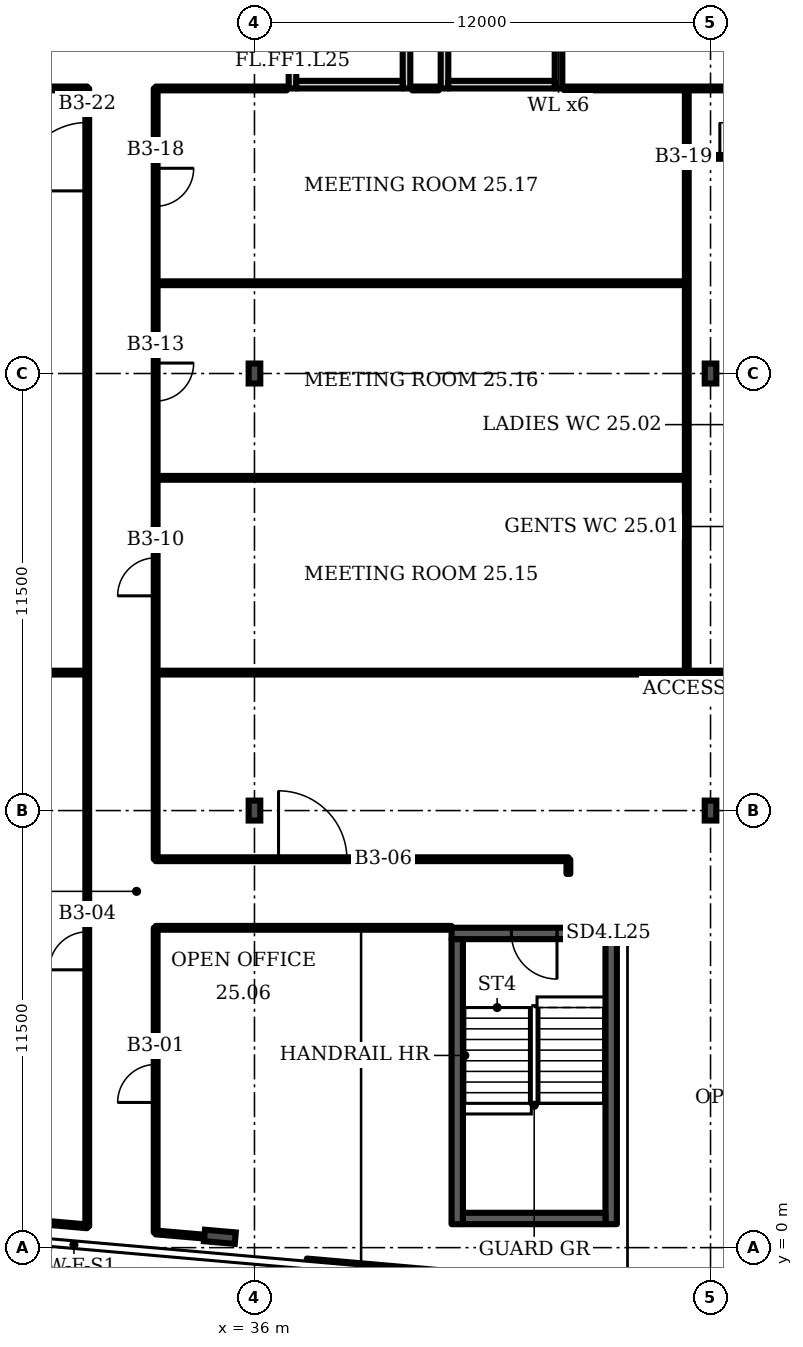
"""IFC4 building model, lengths in metres.
Left out: names, types, materials, properties, quantities, classifications, styles, units other than length and angle.
Written with IfcOpenShell. Run it as: python <this file> out.ifc"""

import sys

from ifc_helpers import new_model, si_unit, direction, frame, frame_2d, origin, origin_2d, place, context, subcontext, project, spatial, rectangle, i_section, extrude, element, fill, save


model = new_model("IFC4")
c1 = context("Model", 3, precision=1e-05, world=origin(), true_north=direction((0.0, 1.0)))
c2 = subcontext(c1, "Body", "Model", "MODEL_VIEW")
j1 = project(units=[si_unit("LENGTHUNIT", "METRE"), si_unit("PLANEANGLEUNIT", "RADIAN")], contexts=[c1])
p1 = place(None, origin())
s1 = spatial("IfcSite", under=j1, at=p1, CompositionType="ELEMENT")
p2 = place(p1, origin())
s2 = spatial("IfcBuilding", under=s1, at=p2, CompositionType="ELEMENT")
p3 = place(p2, frame((0.0, 0.0, 111.1)))
s3 = spatial("IfcBuildingStorey", under=s2, at=p3, CompositionType="ELEMENT", Elevation=111.1)
p4 = place(p3, frame((35.089, 0.285, 0.0), z_axis=(0.0, 0.0, 1.0), x_axis=(-0.087156, -0.996198, 0.0)))
e1 = element("IfcColumn", 1, at=p4, inside=s3, PredefinedType="COLUMN", context=c2, shape_type="SweptSolid", body=[
    extrude(i_section(OverallWidth=0.303, OverallDepth=0.814, WebThickness=0.021, FlangeThickness=0.04, FilletRadius=0.03, at=origin_2d()), origin(), (0.0, 0.0, 1.0), 3.6),
])
for number, where, z_axis, x_axis in (
    (2, (36.0, 11.5, 0.0), (0.0, 0.0, 1.0), (1.0, 0.0, 0.0)),
    (3, (48.0, 11.5, 0.0), (0.0, 0.0, 1.0), (1.0, 0.0, 0.0)),
    (4, (36.0, 23.0, 0.0), (0.0, 0.0, 1.0), (1.0, 0.0, 0.0)),
    (5, (48.0, 23.0, 0.0), (0.0, 0.0, 1.0), (1.0, 0.0, 0.0)),
):
    element("IfcColumn", number, at=place(p3, frame(where, z_axis=z_axis, x_axis=x_axis)), inside=s3, PredefinedType="COLUMN", context=c2, shape_type="SweptSolid", body=[
        extrude(i_section(OverallWidth=0.306, OverallDepth=0.524, WebThickness=0.021, FlangeThickness=0.04, FilletRadius=0.027, at=origin_2d()), origin(), (0.0, 0.0, 1.0), 3.6),
    ])
p5 = place(p3, frame((37.363, -0.461, 0.0), z_axis=(0.0, 0.0, 1.0), x_axis=(0.996194, -0.087159, 0.0)))
e6 = element("IfcWall", 6, at=p5, inside=s3, PredefinedType="SOLIDWALL", context=c2, shape_type="SweptSolid", body=[
    extrude(rectangle(XDim=12.199, YDim=0.35, at=frame_2d((6.099, 0.0))), origin(), (0.0, 0.0, 1.0), 1.0),
])
p6 = place(p3, frame((37.0, 30.5, 0.0), z_axis=(0.0, 0.0, 1.0), x_axis=(0.0, 1.0, 0.0)))
e7 = element("IfcWall", 7, at=p6, inside=s3, PredefinedType="PARTITIONING", context=c2, shape_type="SweptSolid", body=[
    extrude(rectangle(XDim=3.5, YDim=0.2, at=frame_2d((1.75, 0.0))), origin(), (0.0, 0.0, 1.0), 3.2),
])
p7 = place(p6, frame((1.2, 0.0, 0.0)))
e8 = element("IfcOpeningElement", 8, at=p7, cuts=e7, PredefinedType="OPENING", context=c2, shape_type="SweptSolid", body=[
    extrude(rectangle(XDim=1.1, YDim=2.1, at=frame_2d((0.55, 1.05))), frame((0.0, 0.11, 0.0), z_axis=(0.0, -1.0, 0.0), x_axis=(1.0, 0.0, 0.0)), (0.0, 0.0, 1.0), 0.22),
])
p8 = place(p3, frame((40.0, 30.5, 0.0), z_axis=(0.0, 0.0, 1.0), x_axis=(0.0, 1.0, 0.0)))
e9 = element("IfcWall", 9, at=p8, inside=s3, PredefinedType="PARTITIONING", context=c2, shape_type="SweptSolid", body=[
    extrude(rectangle(XDim=3.5, YDim=0.2, at=frame_2d((1.75, 0.0))), origin(), (0.0, 0.0, 1.0), 3.2),
])
p9 = place(p3, frame((37.1, 30.6, 0.0), z_axis=(0.0, 0.0, 1.0), x_axis=(1.0, 0.0, 0.0)))
e10 = element("IfcWall", 10, at=p9, inside=s3, PredefinedType="PARTITIONING", context=c2, shape_type="SweptSolid", body=[
    extrude(rectangle(XDim=2.8, YDim=0.2, at=frame_2d((1.4, 0.0))), origin(), (0.0, 0.0, 1.0), 3.2),
])
p10 = place(p3, frame((41.0, 30.5, 0.0), z_axis=(0.0, 0.0, 1.0), x_axis=(0.0, 1.0, 0.0)))
e11 = element("IfcWall", 11, at=p10, inside=s3, PredefinedType="PARTITIONING", context=c2, shape_type="SweptSolid", body=[
    extrude(rectangle(XDim=3.5, YDim=0.2, at=frame_2d((1.75, 0.0))), origin(), (0.0, 0.0, 1.0), 3.2),
])
p11 = place(p3, frame((44.0, 30.5, 0.0), z_axis=(0.0, 0.0, 1.0), x_axis=(0.0, 1.0, 0.0)))
e12 = element("IfcWall", 12, at=p11, inside=s3, PredefinedType="PARTITIONING", context=c2, shape_type="SweptSolid", body=[
    extrude(rectangle(XDim=3.5, YDim=0.2, at=frame_2d((1.75, 0.0))), origin(), (0.0, 0.0, 1.0), 3.2),
])
p12 = place(p11, frame((1.2, 0.0, 0.0)))
e13 = element("IfcOpeningElement", 13, at=p12, cuts=e12, PredefinedType="OPENING", context=c2, shape_type="SweptSolid", body=[
    extrude(rectangle(XDim=1.1, YDim=2.1, at=frame_2d((0.55, 1.05))), frame((0.0, 0.11, 0.0), z_axis=(0.0, -1.0, 0.0), x_axis=(1.0, 0.0, 0.0)), (0.0, 0.0, 1.0), 0.22),
])
p13 = place(p3, frame((41.1, 30.6, 0.0), z_axis=(0.0, 0.0, 1.0), x_axis=(1.0, 0.0, 0.0)))
e14 = element("IfcWall", 14, at=p13, inside=s3, PredefinedType="PARTITIONING", context=c2, shape_type="SweptSolid", body=[
    extrude(rectangle(XDim=2.8, YDim=0.2, at=frame_2d((1.4, 0.0))), origin(), (0.0, 0.0, 1.0), 3.2),
])
p14 = place(p3, frame((41.185, 8.267, 0.0), z_axis=(0.0, 0.0, 1.0), x_axis=(1.0, 0.0, 0.0)))
e15 = element("IfcWall", 15, at=p14, inside=s3, PredefinedType="SHEAR", context=c2, shape_type="SweptSolid", body=[
    extrude(rectangle(XDim=4.35, YDim=0.3, at=frame_2d((2.175, 0.0))), origin(), (0.0, 0.0, 1.0), 3.2),
])
p15 = place(p14, frame((1.575, 0.0, 0.0)))
e16 = element("IfcOpeningElement", 16, at=p15, cuts=e15, PredefinedType="OPENING", context=c2, shape_type="SweptSolid", body=[
    extrude(rectangle(XDim=1.2, YDim=2.1, at=frame_2d((0.6, 1.05))), frame((0.0, 0.16, 0.0), z_axis=(0.0, -1.0, 0.0), x_axis=(1.0, 0.0, 0.0)), (0.0, 0.0, 1.0), 0.32),
])
p16 = place(p3, frame((13.0, 15.13, 0.0), z_axis=(0.0, 0.0, 1.0), x_axis=(1.0, 0.0, 0.0)))
e17 = element("IfcWall", 17, at=p16, inside=s3, PredefinedType="PARTITIONING", context=c2, shape_type="SweptSolid", body=[
    extrude(rectangle(XDim=18.6, YDim=0.1, at=frame_2d((9.3, 0.0))), origin(), (0.0, 0.0, 1.0), 3.2),
])
p17 = place(p3, frame((17.8, 30.5, 0.0), z_axis=(0.0, 0.0, 1.0), x_axis=(1.0, 0.0, 0.0)))
e18 = element("IfcWall", 18, at=p17, inside=s3, PredefinedType="PARTITIONING", context=c2, shape_type="SweptSolid", body=[
    extrude(rectangle(XDim=13.8, YDim=0.1, at=frame_2d((6.9, 0.0))), origin(), (0.0, 0.0, 1.0), 3.2),
])
p18 = place(p3, frame((31.6, 0.56, 0.0), z_axis=(0.0, 0.0, 1.0), x_axis=(0.0, 1.0, 0.0)))
e19 = element("IfcWall", 19, at=p18, inside=s3, PredefinedType="PARTITIONING", context=c2, shape_type="SweptSolid", body=[
    extrude(rectangle(XDim=29.94, YDim=0.1, at=frame_2d((14.97, 0.0))), origin(), (0.0, 0.0, 1.0), 3.2),
])
p19 = place(p18, frame((6.75, 0.0, 0.0)))
e20 = element("IfcOpeningElement", 20, at=p19, cuts=e19, PredefinedType="OPENING", context=c2, shape_type="SweptSolid", body=[
    extrude(rectangle(XDim=1.0, YDim=2.1, at=frame_2d((0.5, 1.05))), frame((0.0, 0.06, 0.0), z_axis=(0.0, -1.0, 0.0), x_axis=(1.0, 0.0, 0.0)), (0.0, 0.0, 1.0), 0.12),
])
p20 = place(p18, frame((27.245, 0.0, 0.0)))
e21 = element("IfcOpeningElement", 21, at=p20, cuts=e19, PredefinedType="OPENING", context=c2, shape_type="SweptSolid", body=[
    extrude(rectangle(XDim=1.8, YDim=2.1, at=frame_2d((0.9, 1.05))), frame((0.0, 0.06, 0.0), z_axis=(0.0, -1.0, 0.0), x_axis=(1.0, 0.0, 0.0)), (0.0, 0.0, 1.0), 0.12),
])
p21 = place(p3, frame((31.6, 0.56, 0.0), z_axis=(0.0, 0.0, 1.0), x_axis=(-0.996229, 0.086796, 0.0)))
e22 = element("IfcWall", 22, at=p21, inside=s3, PredefinedType="PARTITIONING", context=c2, shape_type="SweptSolid", body=[
    extrude(rectangle(XDim=6.911, YDim=0.1, at=frame_2d((3.456, 0.0))), origin(), (0.0, 0.0, 1.0), 2.58),
])
p22 = place(p3, frame((33.4, 0.4, 0.0), z_axis=(0.0, 0.0, 1.0), x_axis=(0.0, 1.0, 0.0)))
e23 = element("IfcWall", 23, at=p22, inside=s3, PredefinedType="PARTITIONING", context=c2, shape_type="SweptSolid", body=[
    extrude(rectangle(XDim=8.015, YDim=0.1, at=frame_2d((4.008, 0.0))), origin(), (0.0, 0.0, 1.0), 3.2),
])
p23 = place(p22, frame((3.42, 0.0, 0.0)))
e24 = element("IfcOpeningElement", 24, at=p23, cuts=e23, PredefinedType="OPENING", context=c2, shape_type="SweptSolid", body=[
    extrude(rectangle(XDim=1.0, YDim=2.1, at=frame_2d((0.5, 1.05))), frame((0.0, 0.06, 0.0), z_axis=(0.0, -1.0, 0.0), x_axis=(1.0, 0.0, 0.0)), (0.0, 0.0, 1.0), 0.12),
])
p24 = place(p3, frame((33.4, 8.415, 0.0), z_axis=(0.0, 0.0, 1.0), x_axis=(1.0, 0.0, 0.0)))
e25 = element("IfcWall", 25, at=p24, inside=s3, PredefinedType="PARTITIONING", context=c2, shape_type="SweptSolid", body=[
    extrude(rectangle(XDim=7.785, YDim=0.1, at=frame_2d((3.893, 0.0))), origin(), (0.0, 0.0, 1.0), 3.2),
])
p25 = place(p3, frame((33.4, 10.22, 0.0), z_axis=(0.0, 0.0, 1.0), x_axis=(0.0, 1.0, 0.0)))
e26 = element("IfcWall", 26, at=p25, inside=s3, PredefinedType="PARTITIONING", context=c2, shape_type="SweptSolid", body=[
    extrude(rectangle(XDim=20.28, YDim=0.1, at=frame_2d((10.14, 0.0))), origin(), (0.0, 0.0, 1.0), 3.2),
])
p26 = place(p25, frame((6.93, 0.0, 0.0)))
e27 = element("IfcOpeningElement", 27, at=p26, cuts=e26, PredefinedType="OPENING", context=c2, shape_type="SweptSolid", body=[
    extrude(rectangle(XDim=1.0, YDim=2.1, at=frame_2d((0.5, 1.05))), frame((0.0, 0.06, 0.0), z_axis=(0.0, -1.0, 0.0), x_axis=(1.0, 0.0, 0.0)), (0.0, 0.0, 1.0), 0.12),
])
p27 = place(p25, frame((12.055, 0.0, 0.0)))
e28 = element("IfcOpeningElement", 28, at=p27, cuts=e26, PredefinedType="OPENING", context=c2, shape_type="SweptSolid", body=[
    extrude(rectangle(XDim=1.0, YDim=2.1, at=frame_2d((0.5, 1.05))), frame((0.0, 0.06, 0.0), z_axis=(0.0, -1.0, 0.0), x_axis=(1.0, 0.0, 0.0)), (0.0, 0.0, 1.0), 0.12),
])
p28 = place(p25, frame((17.18, 0.0, 0.0)))
e29 = element("IfcOpeningElement", 29, at=p28, cuts=e26, PredefinedType="OPENING", context=c2, shape_type="SweptSolid", body=[
    extrude(rectangle(XDim=1.0, YDim=2.1, at=frame_2d((0.5, 1.05))), frame((0.0, 0.06, 0.0), z_axis=(0.0, -1.0, 0.0), x_axis=(1.0, 0.0, 0.0)), (0.0, 0.0, 1.0), 0.12),
])
p29 = place(p3, frame((33.4, 10.22, 0.0), z_axis=(0.0, 0.0, 1.0), x_axis=(1.0, 0.0, 0.0)))
e30 = element("IfcWall", 30, at=p29, inside=s3, PredefinedType="PARTITIONING", context=c2, shape_type="SweptSolid", body=[
    extrude(rectangle(XDim=10.86, YDim=0.1, at=frame_2d((5.43, 0.0))), origin(), (0.0, 0.0, 1.0), 3.2),
])
p30 = place(p29, frame((3.233, 0.0, 0.0)))
e31 = element("IfcOpeningElement", 31, at=p30, cuts=e30, PredefinedType="OPENING", context=c2, shape_type="SweptSolid", body=[
    extrude(rectangle(XDim=1.8, YDim=2.1, at=frame_2d((0.9, 1.05))), frame((0.0, 0.06, 0.0), z_axis=(0.0, -1.0, 0.0), x_axis=(1.0, 0.0, 0.0)), (0.0, 0.0, 1.0), 0.12),
])
p31 = place(p3, frame((33.4, 15.13, 0.0), z_axis=(0.0, 0.0, 1.0), x_axis=(1.0, 0.0, 0.0)))
e32 = element("IfcWall", 32, at=p31, inside=s3, PredefinedType="PARTITIONING", context=c2, shape_type="SweptSolid", body=[
    extrude(rectangle(XDim=24.2, YDim=0.1, at=frame_2d((12.1, 0.0))), origin(), (0.0, 0.0, 1.0), 3.2),
])
for number, where, z_axis, x_axis in (
    (33, (33.4, 20.255, 0.0), (0.0, 0.0, 1.0), (1.0, 0.0, 0.0)),
    (34, (33.4, 25.375, 0.0), (0.0, 0.0, 1.0), (1.0, 0.0, 0.0)),
):
    element("IfcWall", number, at=place(p3, frame(where, z_axis=z_axis, x_axis=x_axis)), inside=s3, PredefinedType="PARTITIONING", context=c2, shape_type="SweptSolid", body=[
        extrude(rectangle(XDim=13.975, YDim=0.1, at=frame_2d((6.988, 0.0))), origin(), (0.0, 0.0, 1.0), 3.2),
    ])
p32 = place(p3, frame((33.4, 30.5, 0.0), z_axis=(0.0, 0.0, 1.0), x_axis=(1.0, 0.0, 0.0)))
e35 = element("IfcWall", 35, at=p32, inside=s3, PredefinedType="PARTITIONING", context=c2, shape_type="SweptSolid", body=[
    extrude(rectangle(XDim=3.45, YDim=0.1, at=frame_2d((1.725, 0.0))), origin(), (0.0, 0.0, 1.0), 3.2),
])
p33 = place(p3, frame((35.085, 0.255, 0.0), z_axis=(0.0, 0.0, 1.0), x_axis=(-0.996316, 0.085745, 0.0)))
e36 = element("IfcWall", 36, at=p33, inside=s3, PredefinedType="PARTITIONING", context=c2, shape_type="SweptSolid", body=[
    extrude(rectangle(XDim=1.691, YDim=0.1, at=frame_2d((0.846, 0.0))), origin(), (0.0, 0.0, 1.0), 2.58),
])
p34 = place(p3, frame((44.26, 9.835, 0.0), z_axis=(0.0, 0.0, 1.0), x_axis=(0.0, 1.0, 0.0)))
e37 = element("IfcWall", 37, at=p34, inside=s3, PredefinedType="PARTITIONING", context=c2, shape_type="SweptSolid", body=[
    extrude(rectangle(XDim=0.38, YDim=0.1, at=frame_2d((0.19, 0.0))), origin(), (0.0, 0.0, 1.0), 3.2),
])
p35 = place(p3, frame((47.375, 15.13, 0.0), z_axis=(0.0, 0.0, 1.0), x_axis=(0.0, 1.0, 0.0)))
e38 = element("IfcWall", 38, at=p35, inside=s3, PredefinedType="PARTITIONING", context=c2, shape_type="SweptSolid", body=[
    extrude(rectangle(XDim=15.36, YDim=0.1, at=frame_2d((7.68, 0.0))), origin(), (0.0, 0.0, 1.0), 3.2),
])
p36 = place(p3, frame((47.375, 28.7, 0.0), z_axis=(0.0, 0.0, 1.0), x_axis=(1.0, 0.0, 0.0)))
e39 = element("IfcWall", 39, at=p36, inside=s3, PredefinedType="PARTITIONING", context=c2, shape_type="SweptSolid", body=[
    extrude(rectangle(XDim=6.875, YDim=0.1, at=frame_2d((3.438, 0.0))), origin(), (0.0, 0.0, 1.0), 3.2),
])
p37 = place(p36, frame((0.87, 0.0, 0.0)))
e40 = element("IfcOpeningElement", 40, at=p37, cuts=e39, PredefinedType="OPENING", context=c2, shape_type="SweptSolid", body=[
    extrude(rectangle(XDim=0.9, YDim=2.1, at=frame_2d((0.45, 1.05))), frame((0.0, 0.06, 0.0), z_axis=(0.0, -1.0, 0.0), x_axis=(1.0, 0.0, 0.0)), (0.0, 0.0, 1.0), 0.12),
])
p38 = place(p36, frame((3.26, 0.0, 0.0)))
e41 = element("IfcOpeningElement", 41, at=p38, cuts=e39, PredefinedType="OPENING", context=c2, shape_type="SweptSolid", body=[
    extrude(rectangle(XDim=0.9, YDim=2.1, at=frame_2d((0.45, 1.05))), frame((0.0, 0.06, 0.0), z_axis=(0.0, -1.0, 0.0), x_axis=(1.0, 0.0, 0.0)), (0.0, 0.0, 1.0), 0.12),
])
p39 = place(p36, frame((5.395, 0.0, 0.0)))
e42 = element("IfcOpeningElement", 42, at=p39, cuts=e39, PredefinedType="OPENING", context=c2, shape_type="SweptSolid", body=[
    extrude(rectangle(XDim=1.0, YDim=2.1, at=frame_2d((0.5, 1.05))), frame((0.0, 0.06, 0.0), z_axis=(0.0, -1.0, 0.0), x_axis=(1.0, 0.0, 0.0)), (0.0, 0.0, 1.0), 0.12),
])
p40 = place(p3, frame((40.15, 30.5, 0.0), z_axis=(0.0, 0.0, 1.0), x_axis=(1.0, 0.0, 0.0)))
e43 = element("IfcWall", 43, at=p40, inside=s3, PredefinedType="PARTITIONING", context=c2, shape_type="SweptSolid", body=[
    extrude(rectangle(XDim=0.7, YDim=0.1, at=frame_2d((0.35, 0.0))), origin(), (0.0, 0.0, 1.0), 3.2),
])
p41 = place(p3, frame((44.15, 30.5, 0.0), z_axis=(0.0, 0.0, 1.0), x_axis=(1.0, 0.0, 0.0)))
e44 = element("IfcWall", 44, at=p41, inside=s3, PredefinedType="PARTITIONING", context=c2, shape_type="SweptSolid", body=[
    extrude(rectangle(XDim=13.45, YDim=0.1, at=frame_2d((6.725, 0.0))), origin(), (0.0, 0.0, 1.0), 3.2),
])
for number, where, z_axis, x_axis in (
    (45, (41.335, 0.617, 0.0), (0.0, 0.0, 1.0), (0.0, 1.0, 0.0)),
    (46, (45.385, 0.617, 0.0), (0.0, 0.0, 1.0), (0.0, 1.0, 0.0)),
):
    element("IfcWall", number, at=place(p3, frame(where, z_axis=z_axis, x_axis=x_axis)), inside=s3, PredefinedType="SHEAR", context=c2, shape_type="SweptSolid", body=[
        extrude(rectangle(XDim=7.5, YDim=0.3, at=frame_2d((3.75, 0.0))), origin(), (0.0, 0.0, 1.0), 3.2),
    ])
p42 = place(p3, frame((41.485, 0.767, 0.0), z_axis=(0.0, 0.0, 1.0), x_axis=(1.0, 0.0, 0.0)))
e47 = element("IfcWall", 47, at=p42, inside=s3, PredefinedType="SHEAR", context=c2, shape_type="SweptSolid", body=[
    extrude(rectangle(XDim=3.75, YDim=0.3, at=frame_2d((1.875, 0.0))), origin(), (0.0, 0.0, 1.0), 3.2),
])
p43 = place(p15, origin())
e48 = element("IfcDoor", 48, at=p43, inside=s3, OperationType="SINGLE_SWING_RIGHT", PredefinedType="DOOR", context=c2, shape_type="SweptSolid", body=[
    extrude(rectangle(XDim=1.2, YDim=2.1, at=frame_2d((0.6, 1.05))), frame((0.0, 0.025, 0.0), z_axis=(0.0, -1.0, 0.0), x_axis=(1.0, 0.0, 0.0)), (0.0, 0.0, 1.0), 0.05),
])
fill(e16, e48)
p44 = place(p23, origin())
e49 = element("IfcDoor", 49, at=p44, inside=s3, OperationType="SINGLE_SWING_LEFT", PredefinedType="DOOR", context=c2, shape_type="SweptSolid", body=[
    extrude(rectangle(XDim=1.0, YDim=2.1, at=frame_2d((0.5, 1.05))), frame((0.0, 0.025, 0.0), z_axis=(0.0, -1.0, 0.0), x_axis=(1.0, 0.0, 0.0)), (0.0, 0.0, 1.0), 0.05),
])
fill(e24, e49)
p45 = place(p19, origin())
e50 = element("IfcDoor", 50, at=p45, inside=s3, OperationType="SINGLE_SWING_LEFT", PredefinedType="DOOR", context=c2, shape_type="SweptSolid", body=[
    extrude(rectangle(XDim=1.0, YDim=2.1, at=frame_2d((0.5, 1.05))), frame((0.0, 0.025, 0.0), z_axis=(0.0, -1.0, 0.0), x_axis=(1.0, 0.0, 0.0)), (0.0, 0.0, 1.0), 0.05),
])
fill(e20, e50)
p46 = place(p30, origin())
e51 = element("IfcDoor", 51, at=p46, inside=s3, OperationType="DOUBLE_DOOR_SINGLE_SWING", PredefinedType="DOOR", context=c2, shape_type="SweptSolid", body=[
    extrude(rectangle(XDim=1.8, YDim=2.1, at=frame_2d((0.9, 1.05))), frame((0.0, 0.025, 0.0), z_axis=(0.0, -1.0, 0.0), x_axis=(1.0, 0.0, 0.0)), (0.0, 0.0, 1.0), 0.05),
])
fill(e31, e51)
p47 = place(p26, origin())
e52 = element("IfcDoor", 52, at=p47, inside=s3, OperationType="SINGLE_SWING_LEFT", PredefinedType="DOOR", context=c2, shape_type="SweptSolid", body=[
    extrude(rectangle(XDim=1.0, YDim=2.1, at=frame_2d((0.5, 1.05))), frame((0.0, 0.025, 0.0), z_axis=(0.0, -1.0, 0.0), x_axis=(1.0, 0.0, 0.0)), (0.0, 0.0, 1.0), 0.05),
])
fill(e27, e52)
p48 = place(p27, origin())
e53 = element("IfcDoor", 53, at=p48, inside=s3, OperationType="SINGLE_SWING_RIGHT", PredefinedType="DOOR", context=c2, shape_type="SweptSolid", body=[
    extrude(rectangle(XDim=1.0, YDim=2.1, at=frame_2d((0.5, 1.05))), frame((0.0, 0.025, 0.0), z_axis=(0.0, -1.0, 0.0), x_axis=(1.0, 0.0, 0.0)), (0.0, 0.0, 1.0), 0.05),
])
fill(e28, e53)
p49 = place(p28, origin())
e54 = element("IfcDoor", 54, at=p49, inside=s3, OperationType="SINGLE_SWING_RIGHT", PredefinedType="DOOR", context=c2, shape_type="SweptSolid", body=[
    extrude(rectangle(XDim=1.0, YDim=2.1, at=frame_2d((0.5, 1.05))), frame((0.0, 0.025, 0.0), z_axis=(0.0, -1.0, 0.0), x_axis=(1.0, 0.0, 0.0)), (0.0, 0.0, 1.0), 0.05),
])
fill(e29, e54)
p50 = place(p37, origin())
e55 = element("IfcDoor", 55, at=p50, inside=s3, OperationType="SINGLE_SWING_LEFT", PredefinedType="DOOR", context=c2, shape_type="SweptSolid", body=[
    extrude(rectangle(XDim=0.9, YDim=2.1, at=frame_2d((0.45, 1.05))), frame((0.0, 0.025, 0.0), z_axis=(0.0, -1.0, 0.0), x_axis=(1.0, 0.0, 0.0)), (0.0, 0.0, 1.0), 0.05),
])
fill(e40, e55)
p51 = place(p20, origin())
e56 = element("IfcDoor", 56, at=p51, inside=s3, OperationType="DOUBLE_DOOR_SINGLE_SWING", PredefinedType="DOOR", context=c2, shape_type="SweptSolid", body=[
    extrude(rectangle(XDim=1.8, YDim=2.1, at=frame_2d((0.9, 1.05))), frame((0.0, 0.025, 0.0), z_axis=(0.0, -1.0, 0.0), x_axis=(1.0, 0.0, 0.0)), (0.0, 0.0, 1.0), 0.05),
])
fill(e21, e56)
save(model, sys.argv[1])
